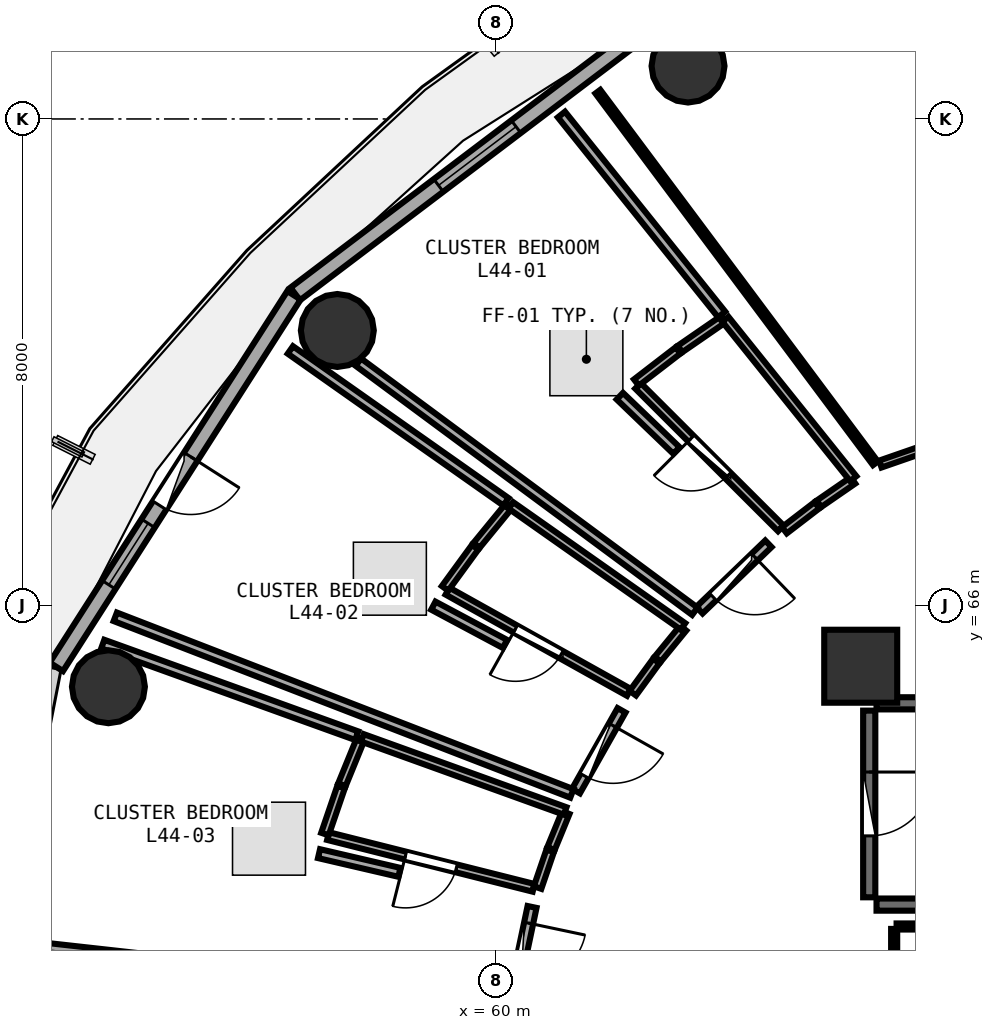
"""IFC4 building model, lengths in metres.
Left out: names, types, materials, properties, quantities, classifications, styles, units other than length and angle.
Written with IfcOpenShell. Run it as: python <this file> out.ifc"""

import sys

from ifc_helpers import new_model, si_unit, direction, frame, frame_2d, origin, origin_2d, place, context, subcontext, project, spatial, rectangle, circle, extrude, element, fill, save


model = new_model("IFC4")
c1 = context("Model", 3, precision=1e-05, world=origin(), true_north=direction((0.0, 1.0)))
c2 = subcontext(c1, "Body", "Model", "MODEL_VIEW")
j1 = project(units=[si_unit("LENGTHUNIT", "METRE"), si_unit("PLANEANGLEUNIT", "RADIAN")], contexts=[c1])
p1 = place(None, origin())
s1 = spatial("IfcSite", under=j1, at=p1, CompositionType="ELEMENT")
p2 = place(p1, origin())
s2 = spatial("IfcBuilding", under=s1, at=p2, CompositionType="ELEMENT")
p3 = place(p2, frame((0.0, 0.0, 173.1)))
s3 = spatial("IfcBuildingStorey", under=s2, at=p3, CompositionType="ELEMENT", Elevation=173.1)
p4 = place(p3, frame((66.0, 65.0, 0.0), z_axis=(0.0, 0.0, 1.0), x_axis=(1.0, 0.0, 0.0)))
e1 = element("IfcColumn", 1, at=p4, inside=s3, PredefinedType="PILASTER", context=c2, shape_type="SweptSolid", body=[
    extrude(rectangle(XDim=1.2, YDim=1.2, at=origin_2d()), origin(), (0.0, 0.0, 1.0), 3.75),
])
for number, where, z_axis, x_axis in (
    (2, (63.16, 74.87, 0.0), (0.0, 0.0, 1.0), (1.0, 0.0, 0.0)),
    (3, (57.392, 70.521, 0.0), (0.0, 0.0, 1.0), (1.0, 0.0, 0.0)),
    (4, (53.627, 64.663, 0.0), (0.0, 0.0, 1.0), (1.0, 0.0, 0.0)),
):
    element("IfcColumn", number, at=place(p3, frame(where, z_axis=z_axis, x_axis=x_axis)), inside=s3, PredefinedType="COLUMN", context=c2, shape_type="SweptSolid", body=[
        extrude(circle(Radius=0.6, at=origin_2d()), origin(), (0.0, 0.0, 1.0), 3.75),
    ])
p5 = place(p3, frame((62.688, 75.658, 0.0), z_axis=(0.0, 0.0, 1.0), x_axis=(-0.797163719609, -0.603763202042, 0.0)))
e5 = element("IfcWall", 5, at=p5, inside=s3, PredefinedType="SOLIDWALL", context=c2, shape_type="SweptSolid", body=[
    extrude(rectangle(XDim=7.512, YDim=0.26, at=frame_2d((3.756, 0.0))), origin(), (0.0, 0.0, 1.0), 3.475),
])
p6 = place(p5, frame((2.956, 0.0, 0.85)))
e6 = element("IfcOpeningElement", 6, at=p6, cuts=e5, PredefinedType="OPENING", context=c2, shape_type="SweptSolid", body=[
    extrude(rectangle(XDim=1.6, YDim=1.45, at=frame_2d((0.8, 0.725))), frame((0.0, 0.14, 0.0), z_axis=(0.0, -1.0, 0.0), x_axis=(1.0, 0.0, 0.0)), (0.0, 0.0, 1.0), 0.28),
])
p7 = place(p3, frame((56.679, 71.1, 0.0), z_axis=(0.0, 0.0, 1.0), x_axis=(-0.538801521808, -0.842432739213, 0.0)))
e7 = element("IfcWall", 7, at=p7, inside=s3, PredefinedType="SOLIDWALL", context=c2, shape_type="SweptSolid", body=[
    extrude(rectangle(XDim=7.253, YDim=0.26, at=frame_2d((3.627, 0.0))), origin(), (0.0, 0.0, 1.0), 3.475),
])
p8 = place(p7, frame((3.152, 0.0, 0.0)))
e8 = element("IfcOpeningElement", 8, at=p8, cuts=e7, PredefinedType="OPENING", context=c2, shape_type="SweptSolid", body=[
    extrude(rectangle(XDim=0.95, YDim=2.1, at=frame_2d((0.475, 1.05))), frame((0.0, 0.14, 0.0), z_axis=(0.0, -1.0, 0.0), x_axis=(1.0, 0.0, 0.0)), (0.0, 0.0, 1.0), 0.28),
])
p9 = place(p7, frame((4.452, 0.0, 0.85)))
e9 = element("IfcOpeningElement", 9, at=p9, cuts=e7, PredefinedType="OPENING", context=c2, shape_type="SweptSolid", body=[
    extrude(rectangle(XDim=1.2, YDim=1.45, at=frame_2d((0.6, 0.725))), frame((0.0, 0.14, 0.0), z_axis=(0.0, -1.0, 0.0), x_axis=(1.0, 0.0, 0.0)), (0.0, 0.0, 1.0), 0.28),
])
for number, where, z_axis, x_axis in (
    (10, (66.26, 61.08, 0.0), (0.0, 0.0, 1.0), (1.0, 0.0, 0.0)),
    (11, (73.42, 64.39, 0.0), (0.0, 0.0, 1.0), (-1.0, 0.0, 0.0)),
):
    element("IfcWall", number, at=place(p3, frame(where, z_axis=z_axis, x_axis=x_axis)), inside=s3, PredefinedType="SHEAR", context=c2, shape_type="SweptSolid", body=[
        extrude(rectangle(XDim=7.16, YDim=0.2, at=frame_2d((3.58, 0.0))), origin(), (0.0, 0.0, 1.0), 3.49),
    ])
p10 = place(p3, frame((66.14, 64.27, 0.0), z_axis=(0.0, 0.0, 1.0), x_axis=(0.0, -1.0, 0.0)))
e12 = element("IfcWall", 12, at=p10, inside=s3, PredefinedType="SHEAR", context=c2, shape_type="SweptSolid", body=[
    extrude(rectangle(XDim=3.07, YDim=0.2, at=frame_2d((1.535, 0.0))), origin(), (0.0, 0.0, 1.0), 3.49),
])
p11 = place(p10, frame((1.01, 0.0, 0.0)))
e13 = element("IfcOpeningElement", 13, at=p11, cuts=e12, PredefinedType="OPENING", context=c2, shape_type="SweptSolid", body=[
    extrude(rectangle(XDim=1.05, YDim=2.1, at=frame_2d((0.525, 1.05))), frame((0.0, 0.11, 0.0), z_axis=(0.0, -1.0, 0.0), x_axis=(1.0, 0.0, 0.0)), (0.0, 0.0, 1.0), 0.22),
])
p12 = place(p3, frame((71.958, 70.281, 0.0), z_axis=(0.0, 0.0, 1.0), x_axis=(-0.944685464341, -0.327977702692, 0.0)))
e14 = element("IfcWall", 14, at=p12, inside=s3, PredefinedType="PARTITIONING", context=c2, shape_type="SweptSolid", body=[
    extrude(rectangle(XDim=5.966, YDim=0.12, at=frame_2d((2.983, 0.0))), origin(), (0.0, 0.0, 1.0), 2.975),
])
p13 = place(p12, frame((2.533, 0.0, 0.0)))
e15 = element("IfcOpeningElement", 15, at=p13, cuts=e14, PredefinedType="OPENING", context=c2, shape_type="SweptSolid", body=[
    extrude(rectangle(XDim=0.9, YDim=2.08, at=frame_2d((0.45, 1.04))), frame((0.0, 0.07, 0.0), z_axis=(0.0, -1.0, 0.0), x_axis=(1.0, 0.0, 0.0)), (0.0, 0.0, 1.0), 0.14),
])
p14 = place(p3, frame((64.687, 67.266, 0.0), z_axis=(0.0, 0.0, 1.0), x_axis=(-0.707694933746, 0.706518139011, 0.0)))
e16 = element("IfcWall", 16, at=p14, inside=s3, PredefinedType="PLUMBINGWALL", context=c2, shape_type="SweptSolid", body=[
    extrude(rectangle(XDim=3.319, YDim=0.13, at=frame_2d((1.66, 0.0))), origin(), (0.0, 0.0, 1.0), 3.175),
])
p15 = place(p14, frame((1.23, 0.0, 0.0)))
e17 = element("IfcOpeningElement", 17, at=p15, cuts=e16, PredefinedType="OPENING", context=c2, shape_type="SweptSolid", body=[
    extrude(rectangle(XDim=0.86, YDim=2.05, at=frame_2d((0.43, 1.025))), frame((0.0, 0.075, 0.0), z_axis=(0.0, -1.0, 0.0), x_axis=(1.0, 0.0, 0.0)), (0.0, 0.0, 1.0), 0.15),
])
p16 = place(p3, frame((64.482, 67.013, 0.0), z_axis=(0.0, 0.0, 1.0), x_axis=(-0.720543985977, -0.693409232901, 0.0)))
e18 = element("IfcWall", 18, at=p16, inside=s3, PredefinedType="PARTITIONING", context=c2, shape_type="SweptSolid", body=[
    extrude(rectangle(XDim=1.574, YDim=0.15, at=frame_2d((0.787, 0.0))), origin(), (0.0, 0.0, 1.0), 2.975),
])
p17 = place(p16, frame((0.312, 0.0, 0.0)))
e19 = element("IfcOpeningElement", 19, at=p17, cuts=e18, PredefinedType="OPENING", context=c2, shape_type="SweptSolid", body=[
    extrude(rectangle(XDim=0.95, YDim=2.08, at=frame_2d((0.475, 1.04))), frame((0.0, 0.085, 0.0), z_axis=(0.0, -1.0, 0.0), x_axis=(1.0, 0.0, 0.0)), (0.0, 0.0, 1.0), 0.17),
])
p18 = place(p3, frame((62.188, 64.57, 0.0), z_axis=(0.0, 0.0, 1.0), x_axis=(-0.873255694646, 0.487262241271, 0.0)))
e20 = element("IfcWall", 20, at=p18, inside=s3, PredefinedType="PLUMBINGWALL", context=c2, shape_type="SweptSolid", body=[
    extrude(rectangle(XDim=3.416, YDim=0.13, at=frame_2d((1.708, 0.0))), origin(), (0.0, 0.0, 1.0), 2.975),
])
p19 = place(p18, frame((1.278, 0.0, 0.0)))
e21 = element("IfcOpeningElement", 21, at=p19, cuts=e20, PredefinedType="OPENING", context=c2, shape_type="SweptSolid", body=[
    extrude(rectangle(XDim=0.86, YDim=2.05, at=frame_2d((0.43, 1.025))), frame((0.0, 0.075, 0.0), z_axis=(0.0, -1.0, 0.0), x_axis=(1.0, 0.0, 0.0)), (0.0, 0.0, 1.0), 0.15),
])
p20 = place(p3, frame((62.066, 64.275, 0.0), z_axis=(0.0, 0.0, 1.0), x_axis=(-0.491582624537, -0.870830938388, 0.0)))
e22 = element("IfcWall", 22, at=p20, inside=s3, PredefinedType="PARTITIONING", context=c2, shape_type="SweptSolid", body=[
    extrude(rectangle(XDim=1.526, YDim=0.15, at=frame_2d((0.763, 0.0))), origin(), (0.0, 0.0, 1.0), 3.235),
])
p21 = place(p20, frame((0.288, 0.0, 0.0)))
e23 = element("IfcOpeningElement", 23, at=p21, cuts=e22, PredefinedType="OPENING", context=c2, shape_type="SweptSolid", body=[
    extrude(rectangle(XDim=0.95, YDim=2.08, at=frame_2d((0.475, 1.04))), frame((0.0, 0.085, 0.0), z_axis=(0.0, -1.0, 0.0), x_axis=(1.0, 0.0, 0.0)), (0.0, 0.0, 1.0), 0.17),
])
p22 = place(p3, frame((60.621, 61.356, 0.0), z_axis=(0.0, 0.0, 1.0), x_axis=(-0.969774737706, 0.244001963326, 0.0)))
e24 = element("IfcWall", 24, at=p22, inside=s3, PredefinedType="PLUMBINGWALL", context=c2, shape_type="SweptSolid", body=[
    extrude(rectangle(XDim=3.486, YDim=0.13, at=frame_2d((1.743, 0.0))), origin(), (0.0, 0.0, 1.0), 3.175),
])
p23 = place(p22, frame((1.313, 0.0, 0.0)))
e25 = element("IfcOpeningElement", 25, at=p23, cuts=e24, PredefinedType="OPENING", context=c2, shape_type="SweptSolid", body=[
    extrude(rectangle(XDim=0.86, YDim=2.05, at=frame_2d((0.43, 1.025))), frame((0.0, 0.075, 0.0), z_axis=(0.0, -1.0, 0.0), x_axis=(1.0, 0.0, 0.0)), (0.0, 0.0, 1.0), 0.15),
])
p24 = place(p3, frame((60.594, 61.041, 0.0), z_axis=(0.0, 0.0, 1.0), x_axis=(-0.206257580925, -0.978497731378, 0.0)))
e26 = element("IfcWall", 26, at=p24, inside=s3, PredefinedType="PARTITIONING", context=c2, shape_type="SweptSolid", body=[
    extrude(rectangle(XDim=1.494, YDim=0.15, at=frame_2d((0.747, 0.0))), origin(), (0.0, 0.0, 1.0), 3.48),
])
p25 = place(p24, frame((0.272, 0.0, 0.0)))
e27 = element("IfcOpeningElement", 27, at=p25, cuts=e26, PredefinedType="OPENING", context=c2, shape_type="SweptSolid", body=[
    extrude(rectangle(XDim=0.95, YDim=2.08, at=frame_2d((0.475, 1.04))), frame((0.0, 0.085, 0.0), z_axis=(0.0, -1.0, 0.0), x_axis=(1.0, 0.0, 0.0)), (0.0, 0.0, 1.0), 0.17),
])
p26 = place(p3, frame((72.41, 60.72, 0.0), z_axis=(0.0, 0.0, 1.0), x_axis=(-1.0, 0.0, 0.0)))
e28 = element("IfcWall", 28, at=p26, inside=s3, PredefinedType="PARTITIONING", context=c2, shape_type="SweptSolid", body=[
    extrude(rectangle(XDim=5.82, YDim=0.1, at=frame_2d((2.91, 0.0))), origin(), (0.0, 0.0, 1.0), 3.48),
])
p27 = place(p3, frame((66.55, 60.68, 0.0), z_axis=(0.0, 0.0, 1.0), x_axis=(0.0, -1.0, 0.0)))
e29 = element("IfcWall", 29, at=p27, inside=s3, PredefinedType="PARTITIONING", context=c2, shape_type="SweptSolid", body=[
    extrude(rectangle(XDim=2.383, YDim=0.1, at=frame_2d((1.191, 0.0))), origin(), (0.0, 0.0, 1.0), 3.48),
])
p28 = place(p3, frame((66.242, 68.337, 0.0), z_axis=(0.0, 0.0, 1.0), x_axis=(-0.598416617992, 0.801185091793, 0.0)))
e30 = element("IfcWall", 30, at=p28, inside=s3, PredefinedType="PARTITIONING", context=c2, shape_type="SweptSolid", body=[
    extrude(rectangle(XDim=7.629, YDim=0.1, at=frame_2d((3.814, 0.0))), origin(), (0.0, 0.0, 1.0), 2.975),
])
p29 = place(p3, frame((65.874, 68.058, 0.0), z_axis=(0.0, 0.0, 1.0), x_axis=(-0.823224352539, -0.567716183834, 0.0)))
e31 = element("IfcWall", 31, at=p29, inside=s3, PredefinedType="PLUMBINGWALL", context=c2, shape_type="SweptSolid", body=[
    extrude(rectangle(XDim=0.68, YDim=0.13, at=frame_2d((0.34, 0.0))), origin(), (0.0, 0.0, 1.0), 2.975),
])
p30 = place(p3, frame((65.281, 67.648, 0.0), z_axis=(0.0, 0.0, 1.0), x_axis=(-0.793187600036, -0.608977365055, 0.0)))
e32 = element("IfcWall", 32, at=p30, inside=s3, PredefinedType="PLUMBINGWALL", context=c2, shape_type="SweptSolid", body=[
    extrude(rectangle(XDim=0.676, YDim=0.13, at=frame_2d((0.338, 0.0))), origin(), (0.0, 0.0, 1.0), 2.975),
])
p31 = place(p3, frame((62.311, 69.666, 0.0), z_axis=(0.0, 0.0, 1.0), x_axis=(0.792382565467, 0.610024483069, 0.0)))
e33 = element("IfcWall", 33, at=p31, inside=s3, PredefinedType="PLUMBINGWALL", context=c2, shape_type="SweptSolid", body=[
    extrude(rectangle(XDim=0.865, YDim=0.13, at=frame_2d((0.432, 0.0))), origin(), (0.0, 0.0, 1.0), 3.48),
])
p32 = place(p3, frame((63.029, 70.217, 0.0), z_axis=(0.0, 0.0, 1.0), x_axis=(0.823353055732, 0.567529510789, 0.0)))
e34 = element("IfcWall", 34, at=p32, inside=s3, PredefinedType="PLUMBINGWALL", context=c2, shape_type="SweptSolid", body=[
    extrude(rectangle(XDim=0.869, YDim=0.13, at=frame_2d((0.435, 0.0))), origin(), (0.0, 0.0, 1.0), 3.175),
])
p33 = place(p3, frame((63.773, 70.706, 0.0), z_axis=(0.0, 0.0, 1.0), x_axis=(0.625916574892, -0.779890018704, 0.0)))
e35 = element("IfcWall", 35, at=p33, inside=s3, PredefinedType="PLUMBINGWALL", context=c2, shape_type="SweptSolid", body=[
    extrude(rectangle(XDim=3.362, YDim=0.13, at=frame_2d((1.681, 0.0))), origin(), (0.0, 0.0, 1.0), 2.975),
])
p34 = place(p3, frame((63.272, 65.904, 0.0), z_axis=(0.0, 0.0, 1.0), x_axis=(-0.803728632682, 0.594996037808, 0.0)))
e36 = element("IfcWall", 36, at=p34, inside=s3, PredefinedType="PARTITIONING", context=c2, shape_type="SweptSolid", body=[
    extrude(rectangle(XDim=6.886, YDim=0.15, at=frame_2d((3.443, 0.0))), origin(), (0.0, 0.0, 1.0), 3.175),
])
p35 = place(p3, frame((61.078, 74.073, 0.0), z_axis=(0.0, 0.0, 1.0), x_axis=(0.62540850869, -0.780297505608, 0.0)))
e37 = element("IfcWall", 37, at=p35, inside=s3, PredefinedType="PARTITIONING", context=c2, shape_type="SweptSolid", body=[
    extrude(rectangle(XDim=4.213, YDim=0.15, at=frame_2d((2.107, 0.0))), origin(), (0.0, 0.0, 1.0), 3.025),
])
p36 = place(p3, frame((62.039, 69.441, 0.0), z_axis=(0.0, 0.0, 1.0), x_axis=(0.721428898705, -0.692488515511, 0.0)))
e38 = element("IfcWall", 38, at=p36, inside=s3, PredefinedType="PARTITIONING", context=c2, shape_type="SweptSolid", body=[
    extrude(rectangle(XDim=1.291, YDim=0.15, at=frame_2d((0.646, 0.0))), origin(), (0.0, 0.0, 1.0), 3.175),
])
p37 = place(p3, frame((63.08, 65.627, 0.0), z_axis=(0.0, 0.0, 1.0), x_axis=(-0.633641038052, -0.773627193741, 0.0)))
e39 = element("IfcWall", 39, at=p37, inside=s3, PredefinedType="PLUMBINGWALL", context=c2, shape_type="SweptSolid", body=[
    extrude(rectangle(XDim=0.659, YDim=0.13, at=frame_2d((0.33, 0.0))), origin(), (0.0, 0.0, 1.0), 3.48),
])
p38 = place(p3, frame((62.638, 65.086, 0.0), z_axis=(0.0, 0.0, 1.0), x_axis=(-0.590053970957, -0.807363803596, 0.0)))
e40 = element("IfcWall", 40, at=p38, inside=s3, PredefinedType="PLUMBINGWALL", context=c2, shape_type="SweptSolid", body=[
    extrude(rectangle(XDim=0.655, YDim=0.13, at=frame_2d((0.328, 0.0))), origin(), (0.0, 0.0, 1.0), 2.975),
])
p39 = place(p3, frame((59.164, 66.28, 0.0), z_axis=(0.0, 0.0, 1.0), x_axis=(0.589885116714, 0.807487181991, 0.0)))
e41 = element("IfcWall", 41, at=p39, inside=s3, PredefinedType="PLUMBINGWALL", context=c2, shape_type="SweptSolid", body=[
    extrude(rectangle(XDim=0.838, YDim=0.13, at=frame_2d((0.419, 0.0))), origin(), (0.0, 0.0, 1.0), 3.48),
])
p40 = place(p3, frame((59.683, 66.989, 0.0), z_axis=(0.0, 0.0, 1.0), x_axis=(0.633474035481, 0.773763947449, 0.0)))
e42 = element("IfcWall", 42, at=p40, inside=s3, PredefinedType="PLUMBINGWALL", context=c2, shape_type="SweptSolid", body=[
    extrude(rectangle(XDim=0.844, YDim=0.13, at=frame_2d((0.422, 0.0))), origin(), (0.0, 0.0, 1.0), 3.175),
])
p41 = place(p3, frame((60.246, 67.646, 0.0), z_axis=(0.0, 0.0, 1.0), x_axis=(0.817907250539, -0.575350093, 0.0)))
e43 = element("IfcWall", 43, at=p41, inside=s3, PredefinedType="PLUMBINGWALL", context=c2, shape_type="SweptSolid", body=[
    extrude(rectangle(XDim=3.46, YDim=0.13, at=frame_2d((1.73, 0.0))), origin(), (0.0, 0.0, 1.0), 3.175),
])
p42 = place(p3, frame((61.25, 62.908, 0.0), z_axis=(0.0, 0.0, 1.0), x_axis=(-0.932687580633, 0.360685287936, 0.0)))
e44 = element("IfcWall", 44, at=p42, inside=s3, PredefinedType="PARTITIONING", context=c2, shape_type="SweptSolid", body=[
    extrude(rectangle(XDim=8.052, YDim=0.15, at=frame_2d((4.026, 0.0))), origin(), (0.0, 0.0, 1.0), 2.975),
])
p43 = place(p3, frame((56.62, 70.201, 0.0), z_axis=(0.0, 0.0, 1.0), x_axis=(0.817617957458, -0.575761127241, 0.0)))
e45 = element("IfcWall", 45, at=p43, inside=s3, PredefinedType="PARTITIONING", context=c2, shape_type="SweptSolid", body=[
    extrude(rectangle(XDim=4.337, YDim=0.15, at=frame_2d((2.168, 0.0))), origin(), (0.0, 0.0, 1.0), 3.025),
])
p44 = place(p3, frame((58.971, 65.996, 0.0), z_axis=(0.0, 0.0, 1.0), x_axis=(0.882039066957, -0.471176277376, 0.0)))
e46 = element("IfcWall", 46, at=p44, inside=s3, PredefinedType="PARTITIONING", context=c2, shape_type="SweptSolid", body=[
    extrude(rectangle(XDim=1.336, YDim=0.15, at=frame_2d((0.668, 0.0))), origin(), (0.0, 0.0, 1.0), 3.175),
])
p45 = place(p3, frame((61.15, 62.594, 0.0), z_axis=(0.0, 0.0, 1.0), x_axis=(-0.38036677213, -0.924835725229, 0.0)))
e47 = element("IfcWall", 47, at=p45, inside=s3, PredefinedType="PLUMBINGWALL", context=c2, shape_type="SweptSolid", body=[
    extrude(rectangle(XDim=0.641, YDim=0.13, at=frame_2d((0.321, 0.0))), origin(), (0.0, 0.0, 1.0), 3.235),
])
p46 = place(p3, frame((60.893, 61.964, 0.0), z_axis=(0.0, 0.0, 1.0), x_axis=(-0.324128876048, -0.94601293422, 0.0)))
e48 = element("IfcWall", 48, at=p46, inside=s3, PredefinedType="PLUMBINGWALL", context=c2, shape_type="SweptSolid", body=[
    extrude(rectangle(XDim=0.639, YDim=0.13, at=frame_2d((0.319, 0.0))), origin(), (0.0, 0.0, 1.0), 3.48),
])
p47 = place(p3, frame((57.188, 62.24, 0.0), z_axis=(0.0, 0.0, 1.0), x_axis=(0.324370140969, 0.945930236142, 0.0)))
e49 = element("IfcWall", 49, at=p47, inside=s3, PredefinedType="PLUMBINGWALL", context=c2, shape_type="SweptSolid", body=[
    extrude(rectangle(XDim=0.817, YDim=0.13, at=frame_2d((0.409, 0.0))), origin(), (0.0, 0.0, 1.0), 3.48),
])
p48 = place(p3, frame((57.468, 63.051, 0.0), z_axis=(0.0, 0.0, 1.0), x_axis=(0.378505488692, 0.92559904658, 0.0)))
e50 = element("IfcWall", 50, at=p48, inside=s3, PredefinedType="PLUMBINGWALL", context=c2, shape_type="SweptSolid", body=[
    extrude(rectangle(XDim=0.821, YDim=0.13, at=frame_2d((0.411, 0.0))), origin(), (0.0, 0.0, 1.0), 3.48),
])
p49 = place(p3, frame((57.805, 63.822, 0.0), z_axis=(0.0, 0.0, 1.0), x_axis=(0.940709042882, -0.339214528935, 0.0)))
e51 = element("IfcWall", 51, at=p49, inside=s3, PredefinedType="PLUMBINGWALL", context=c2, shape_type="SweptSolid", body=[
    extrude(rectangle(XDim=3.545, YDim=0.13, at=frame_2d((1.772, 0.0))), origin(), (0.0, 0.0, 1.0), 3.175),
])
p50 = place(p3, frame((60.234, 59.525, 0.0), z_axis=(0.0, 0.0, 1.0), x_axis=(-0.99385157858, 0.110720548017, 0.0)))
e52 = element("IfcWall", 52, at=p50, inside=s3, PredefinedType="PARTITIONING", context=c2, shape_type="SweptSolid", body=[
    extrude(rectangle(XDim=8.158, YDim=0.15, at=frame_2d((4.079, 0.0))), origin(), (0.0, 0.0, 1.0), 3.025),
])
p51 = place(p3, frame((53.535, 65.365, 0.0), z_axis=(0.0, 0.0, 1.0), x_axis=(0.940657292565, -0.339358008517, 0.0)))
e53 = element("IfcWall", 53, at=p51, inside=s3, PredefinedType="PARTITIONING", context=c2, shape_type="SweptSolid", body=[
    extrude(rectangle(XDim=4.44, YDim=0.15, at=frame_2d((2.22, 0.0))), origin(), (0.0, 0.0, 1.0), 2.975),
])
p52 = place(p3, frame((57.091, 61.918, 0.0), z_axis=(0.0, 0.0, 1.0), x_axis=(0.973980333704, -0.226632543023, 0.0)))
e54 = element("IfcWall", 54, at=p52, inside=s3, PredefinedType="PARTITIONING", context=c2, shape_type="SweptSolid", body=[
    extrude(rectangle(XDim=1.357, YDim=0.15, at=frame_2d((0.679, 0.0))), origin(), (0.0, 0.0, 1.0), 3.175),
])
p53 = place(p6, origin())
e55 = element("IfcWindow", 55, at=p53, inside=s3, PartitioningType="SINGLE_PANEL", PredefinedType="WINDOW", context=c2, shape_type="SweptSolid", body=[
    extrude(rectangle(XDim=1.6, YDim=1.45, at=frame_2d((0.8, 0.725))), frame((0.0, 0.03, 0.0), z_axis=(0.0, -1.0, 0.0), x_axis=(1.0, 0.0, 0.0)), (0.0, 0.0, 1.0), 0.06),
])
fill(e6, e55)
p54 = place(p8, frame((0.95, 0.0, 0.0), z_axis=(0.0, 0.0, 1.0), x_axis=(-1.0, 0.0, 0.0)))
e56 = element("IfcDoor", 56, at=p54, inside=s3, OperationType="SINGLE_SWING_RIGHT", PredefinedType="DOOR", context=c2, shape_type="SweptSolid", body=[
    extrude(rectangle(XDim=0.95, YDim=2.1, at=frame_2d((0.475, 1.05))), frame((0.0, 0.025, 0.0), z_axis=(0.0, -1.0, 0.0), x_axis=(1.0, 0.0, 0.0)), (0.0, 0.0, 1.0), 0.05),
])
fill(e8, e56)
p55 = place(p9, origin())
e57 = element("IfcWindow", 57, at=p55, inside=s3, PartitioningType="SINGLE_PANEL", PredefinedType="WINDOW", context=c2, shape_type="SweptSolid", body=[
    extrude(rectangle(XDim=1.2, YDim=1.45, at=frame_2d((0.6, 0.725))), frame((0.0, 0.03, 0.0), z_axis=(0.0, -1.0, 0.0), x_axis=(1.0, 0.0, 0.0)), (0.0, 0.0, 1.0), 0.06),
])
fill(e9, e57)
p56 = place(p11, origin())
e58 = element("IfcDoor", 58, at=p56, inside=s3, OperationType="SINGLE_SWING_LEFT", PredefinedType="DOOR", context=c2, shape_type="SweptSolid", body=[
    extrude(rectangle(XDim=1.05, YDim=2.1, at=frame_2d((0.525, 1.05))), frame((0.0, 0.025, 0.0), z_axis=(0.0, -1.0, 0.0), x_axis=(1.0, 0.0, 0.0)), (0.0, 0.0, 1.0), 0.05),
])
fill(e13, e58)
p57 = place(p15, origin())
e59 = element("IfcDoor", 59, at=p57, inside=s3, OperationType="SINGLE_SWING_RIGHT", PredefinedType="DOOR", context=c2, shape_type="SweptSolid", body=[
    extrude(rectangle(XDim=0.86, YDim=2.05, at=frame_2d((0.43, 1.025))), frame((0.0, 0.025, 0.0), z_axis=(0.0, -1.0, 0.0), x_axis=(1.0, 0.0, 0.0)), (0.0, 0.0, 1.0), 0.05),
])
fill(e17, e59)
p58 = place(p17, origin())
e60 = element("IfcDoor", 60, at=p58, inside=s3, OperationType="SINGLE_SWING_LEFT", PredefinedType="DOOR", context=c2, shape_type="SweptSolid", body=[
    extrude(rectangle(XDim=0.95, YDim=2.08, at=frame_2d((0.475, 1.04))), frame((0.0, 0.025, 0.0), z_axis=(0.0, -1.0, 0.0), x_axis=(1.0, 0.0, 0.0)), (0.0, 0.0, 1.0), 0.05),
])
fill(e19, e60)
p59 = place(p19, origin())
e61 = element("IfcDoor", 61, at=p59, inside=s3, OperationType="SINGLE_SWING_RIGHT", PredefinedType="DOOR", context=c2, shape_type="SweptSolid", body=[
    extrude(rectangle(XDim=0.86, YDim=2.05, at=frame_2d((0.43, 1.025))), frame((0.0, 0.025, 0.0), z_axis=(0.0, -1.0, 0.0), x_axis=(1.0, 0.0, 0.0)), (0.0, 0.0, 1.0), 0.05),
])
fill(e21, e61)
p60 = place(p21, origin())
e62 = element("IfcDoor", 62, at=p60, inside=s3, OperationType="SINGLE_SWING_LEFT", PredefinedType="DOOR", context=c2, shape_type="SweptSolid", body=[
    extrude(rectangle(XDim=0.95, YDim=2.08, at=frame_2d((0.475, 1.04))), frame((0.0, 0.025, 0.0), z_axis=(0.0, -1.0, 0.0), x_axis=(1.0, 0.0, 0.0)), (0.0, 0.0, 1.0), 0.05),
])
fill(e23, e62)
p61 = place(p23, origin())
e63 = element("IfcDoor", 63, at=p61, inside=s3, OperationType="SINGLE_SWING_RIGHT", PredefinedType="DOOR", context=c2, shape_type="SweptSolid", body=[
    extrude(rectangle(XDim=0.86, YDim=2.05, at=frame_2d((0.43, 1.025))), frame((0.0, 0.025, 0.0), z_axis=(0.0, -1.0, 0.0), x_axis=(1.0, 0.0, 0.0)), (0.0, 0.0, 1.0), 0.05),
])
fill(e25, e63)
p62 = place(p25, origin())
e64 = element("IfcDoor", 64, at=p62, inside=s3, OperationType="SINGLE_SWING_LEFT", PredefinedType="DOOR", context=c2, shape_type="SweptSolid", body=[
    extrude(rectangle(XDim=0.95, YDim=2.08, at=frame_2d((0.475, 1.04))), frame((0.0, 0.025, 0.0), z_axis=(0.0, -1.0, 0.0), x_axis=(1.0, 0.0, 0.0)), (0.0, 0.0, 1.0), 0.05),
])
fill(e27, e64)
save(model, sys.argv[1])
